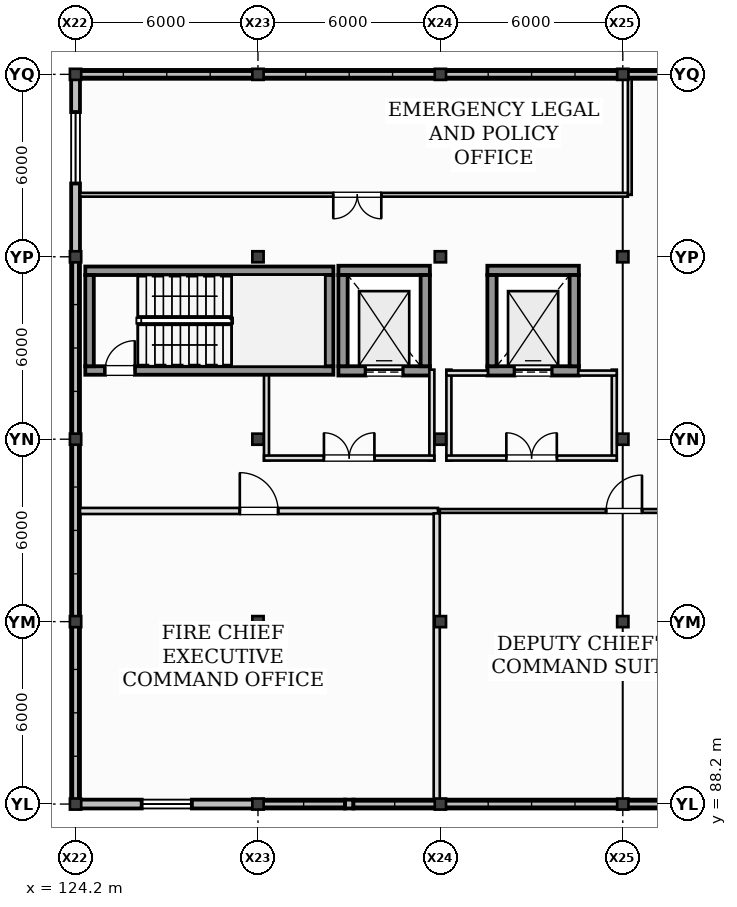
"""IFC4 building model, lengths in metres.
Left out: names, types, materials, properties, quantities, classifications, styles, units other than length and angle.
Written with IfcOpenShell. Run it as: python <this file> out.ifc"""

import sys

from ifc_helpers import new_model, si_unit, direction, frame, frame_2d, origin, origin_2d, place, context, subcontext, project, spatial, rectangle, i_section, extrude, element, fill, save


model = new_model("IFC4")
c1 = context("Model", 3, precision=1e-05, world=origin(), true_north=direction((0.0, 1.0)))
c2 = subcontext(c1, "Body", "Model", "MODEL_VIEW")
j1 = project(units=[si_unit("LENGTHUNIT", "METRE"), si_unit("PLANEANGLEUNIT", "RADIAN")], contexts=[c1])
p1 = place(None, origin())
s1 = spatial("IfcSite", under=j1, at=p1, CompositionType="ELEMENT")
p2 = place(p1, origin())
s2 = spatial("IfcBuilding", under=s1, at=p2, CompositionType="ELEMENT")
p3 = place(p2, frame((0.0, 0.0, 10.0)))
s3 = spatial("IfcBuildingStorey", under=s2, at=p3, CompositionType="ELEMENT", Elevation=10.0)
for number, where, z_axis, x_axis in (
    (1, (124.2, 88.2, 0.0), (0.0, 0.0, 1.0), (1.0, 0.0, 0.0)),
    (2, (124.2, 94.2, 0.0), (0.0, 0.0, 1.0), (1.0, 0.0, 0.0)),
    (3, (124.2, 100.2, 0.0), (0.0, 0.0, 1.0), (1.0, 0.0, 0.0)),
    (4, (124.2, 106.2, 0.0), (0.0, 0.0, 1.0), (1.0, 0.0, 0.0)),
    (5, (124.2, 112.2, 0.0), (0.0, 0.0, 1.0), (1.0, 0.0, 0.0)),
    (6, (130.2, 88.2, 0.0), (0.0, 0.0, 1.0), (1.0, 0.0, 0.0)),
    (7, (130.2, 94.2, 0.0), (0.0, 0.0, 1.0), (1.0, 0.0, 0.0)),
    (8, (130.2, 100.2, 0.0), (0.0, 0.0, 1.0), (1.0, 0.0, 0.0)),
    (9, (130.2, 106.2, 0.0), (0.0, 0.0, 1.0), (1.0, 0.0, 0.0)),
    (10, (130.2, 112.2, 0.0), (0.0, 0.0, 1.0), (1.0, 0.0, 0.0)),
    (11, (136.2, 88.2, 0.0), (0.0, 0.0, 1.0), (1.0, 0.0, 0.0)),
    (12, (136.2, 94.2, 0.0), (0.0, 0.0, 1.0), (1.0, 0.0, 0.0)),
    (13, (136.2, 100.2, 0.0), (0.0, 0.0, 1.0), (1.0, 0.0, 0.0)),
    (14, (136.2, 106.2, 0.0), (0.0, 0.0, 1.0), (1.0, 0.0, 0.0)),
    (15, (136.2, 112.2, 0.0), (0.0, 0.0, 1.0), (1.0, 0.0, 0.0)),
    (16, (142.2, 88.2, 0.0), (0.0, 0.0, 1.0), (1.0, 0.0, 0.0)),
    (17, (142.2, 94.2, 0.0), (0.0, 0.0, 1.0), (1.0, 0.0, 0.0)),
    (18, (142.2, 100.2, 0.0), (0.0, 0.0, 1.0), (1.0, 0.0, 0.0)),
    (19, (142.2, 106.2, 0.0), (0.0, 0.0, 1.0), (1.0, 0.0, 0.0)),
    (20, (142.2, 112.2, 0.0), (0.0, 0.0, 1.0), (1.0, 0.0, 0.0)),
):
    element("IfcColumn", number, at=place(p3, frame(where, z_axis=z_axis, x_axis=x_axis)), inside=s3, PredefinedType="COLUMN", context=c2, shape_type="SweptSolid", body=[
        extrude(i_section(OverallWidth=0.371, OverallDepth=0.364, WebThickness=0.013, FlangeThickness=0.022, at=origin_2d()), origin(), (0.0, 0.0, 1.0), 4.0),
    ])
p4 = place(p3, frame((124.345, 88.2, 0.0), z_axis=(0.0, 0.0, 1.0), x_axis=(1.0, 0.0, 0.0)))
e21 = element("IfcWall", 21, at=p4, inside=s3, PredefinedType="STANDARD", context=c2, shape_type="SweptSolid", body=[
    extrude(rectangle(XDim=5.71, YDim=0.29, at=frame_2d((2.855, 0.0))), origin(), (0.0, 0.0, 1.0), 3.249),
])
p5 = place(p4, frame((2.03, 0.0, 1.0)))
e22 = element("IfcOpeningElement", 22, at=p5, cuts=e21, PredefinedType="OPENING", context=c2, shape_type="SweptSolid", body=[
    extrude(rectangle(XDim=1.65, YDim=1.55, at=frame_2d((0.825, 0.775))), frame((0.0, 0.155, 0.0), z_axis=(0.0, -1.0, 0.0), x_axis=(1.0, 0.0, 0.0)), (0.0, 0.0, 1.0), 0.31),
])
p6 = place(p3, frame((133.06, 88.2, 0.0), z_axis=(0.0, 0.0, 1.0), x_axis=(1.0, 0.0, 0.0)))
e23 = element("IfcWall", 23, at=p6, inside=s3, PredefinedType="STANDARD", context=c2, shape_type="SweptSolid", body=[
    extrude(rectangle(XDim=0.28, YDim=0.29, at=frame_2d((0.14, 0.0))), origin(), (0.0, 0.0, 1.0), 3.249),
])
p7 = place(p3, frame((130.345, 88.2, 0.0), z_axis=(0.0, 0.0, 1.0), x_axis=(1.0, 0.0, 0.0)))
e24 = element("IfcWall", 24, at=p7, inside=s3, PredefinedType="STANDARD", context=c2, shape_type="SweptSolid", body=[
    extrude(rectangle(XDim=2.715, YDim=0.29, at=frame_2d((1.357, 0.0))), origin(), (0.0, 0.0, 1.0), 0.32),
])
p8 = place(p3, frame((133.34, 88.2, 0.0), z_axis=(0.0, 0.0, 1.0), x_axis=(1.0, 0.0, 0.0)))
e25 = element("IfcWall", 25, at=p8, inside=s3, PredefinedType="STANDARD", context=c2, shape_type="SweptSolid", body=[
    extrude(rectangle(XDim=2.715, YDim=0.29, at=frame_2d((1.357, 0.0))), origin(), (0.0, 0.0, 1.0), 0.44),
])
p9 = place(p3, frame((136.345, 88.2, 0.0), z_axis=(0.0, 0.0, 1.0), x_axis=(1.0, 0.0, 0.0)))
e26 = element("IfcWall", 26, at=p9, inside=s3, PredefinedType="STANDARD", context=c2, shape_type="SweptSolid", body=[
    extrude(rectangle(XDim=5.71, YDim=0.29, at=frame_2d((2.855, 0.0))), origin(), (0.0, 0.0, 1.0), 0.56),
])
p10 = place(p3, frame((142.345, 88.2, 0.0), z_axis=(0.0, 0.0, 1.0), x_axis=(1.0, 0.0, 0.0)))
e27 = element("IfcWall", 27, at=p10, inside=s3, PredefinedType="STANDARD", context=c2, shape_type="SweptSolid", body=[
    extrude(rectangle(XDim=2.715, YDim=0.29, at=frame_2d((1.357, 0.0))), origin(), (0.0, 0.0, 1.0), 0.68),
])
p11 = place(p3, frame((130.055, 112.2, 0.0), z_axis=(0.0, 0.0, 1.0), x_axis=(-1.0, 0.0, 0.0)))
e28 = element("IfcWall", 28, at=p11, inside=s3, PredefinedType="STANDARD", context=c2, shape_type="SweptSolid", body=[
    extrude(rectangle(XDim=5.71, YDim=0.29, at=frame_2d((2.855, 0.0))), origin(), (0.0, 0.0, 1.0), 0.32),
])
p12 = place(p3, frame((136.055, 112.2, 0.0), z_axis=(0.0, 0.0, 1.0), x_axis=(-1.0, 0.0, 0.0)))
e29 = element("IfcWall", 29, at=p12, inside=s3, PredefinedType="STANDARD", context=c2, shape_type="SweptSolid", body=[
    extrude(rectangle(XDim=5.71, YDim=0.29, at=frame_2d((2.855, 0.0))), origin(), (0.0, 0.0, 1.0), 0.44),
])
p13 = place(p3, frame((142.055, 112.2, 0.0), z_axis=(0.0, 0.0, 1.0), x_axis=(-1.0, 0.0, 0.0)))
e30 = element("IfcWall", 30, at=p13, inside=s3, PredefinedType="STANDARD", context=c2, shape_type="SweptSolid", body=[
    extrude(rectangle(XDim=5.71, YDim=0.29, at=frame_2d((2.855, 0.0))), origin(), (0.0, 0.0, 1.0), 0.56),
])
p14 = place(p3, frame((148.055, 112.2, 0.0), z_axis=(0.0, 0.0, 1.0), x_axis=(-1.0, 0.0, 0.0)))
e31 = element("IfcWall", 31, at=p14, inside=s3, PredefinedType="STANDARD", context=c2, shape_type="SweptSolid", body=[
    extrude(rectangle(XDim=5.71, YDim=0.29, at=frame_2d((2.855, 0.0))), origin(), (0.0, 0.0, 1.0), 0.68),
])
p15 = place(p3, frame((124.2, 94.055, 0.0), z_axis=(0.0, 0.0, 1.0), x_axis=(0.0, -1.0, 0.0)))
e32 = element("IfcWall", 32, at=p15, inside=s3, PredefinedType="STANDARD", context=c2, shape_type="SweptSolid", body=[
    extrude(rectangle(XDim=5.71, YDim=0.29, at=frame_2d((2.855, 0.0))), origin(), (0.0, 0.0, 1.0), 0.92),
])
p16 = place(p3, frame((124.2, 100.055, 0.0), z_axis=(0.0, 0.0, 1.0), x_axis=(0.0, -1.0, 0.0)))
e33 = element("IfcWall", 33, at=p16, inside=s3, PredefinedType="STANDARD", context=c2, shape_type="SweptSolid", body=[
    extrude(rectangle(XDim=5.71, YDim=0.29, at=frame_2d((2.855, 0.0))), origin(), (0.0, 0.0, 1.0), 0.32),
])
p17 = place(p3, frame((124.2, 106.055, 0.0), z_axis=(0.0, 0.0, 1.0), x_axis=(0.0, -1.0, 0.0)))
e34 = element("IfcWall", 34, at=p17, inside=s3, PredefinedType="STANDARD", context=c2, shape_type="SweptSolid", body=[
    extrude(rectangle(XDim=5.71, YDim=0.29, at=frame_2d((2.855, 0.0))), origin(), (0.0, 0.0, 1.0), 0.44),
])
p18 = place(p3, frame((124.2, 112.055, 0.0), z_axis=(0.0, 0.0, 1.0), x_axis=(0.0, -1.0, 0.0)))
e35 = element("IfcWall", 35, at=p18, inside=s3, PredefinedType="STANDARD", context=c2, shape_type="SweptSolid", body=[
    extrude(rectangle(XDim=5.71, YDim=0.29, at=frame_2d((2.855, 0.0))), origin(), (0.0, 0.0, 1.0), 3.253),
])
p19 = place(p18, frame((1.095, 0.0, 1.0)))
e36 = element("IfcOpeningElement", 36, at=p19, cuts=e35, PredefinedType="OPENING", context=c2, shape_type="SweptSolid", body=[
    extrude(rectangle(XDim=2.35, YDim=1.55, at=frame_2d((1.175, 0.775))), frame((0.0, 0.155, 0.0), z_axis=(0.0, -1.0, 0.0), x_axis=(1.0, 0.0, 0.0)), (0.0, 0.0, 1.0), 0.31),
])
p20 = place(p3, frame((124.52, 102.46, 0.0), z_axis=(0.0, 0.0, 1.0), x_axis=(1.0, 0.0, 0.0)))
e37 = element("IfcWall", 37, at=p20, inside=s3, PredefinedType="SHEAR", context=c2, shape_type="SweptSolid", body=[
    extrude(rectangle(XDim=8.16, YDim=0.28, at=frame_2d((4.08, 0.0))), origin(), (0.0, 0.0, 1.0), 4.0),
])
p21 = place(p20, frame((0.65, 0.0, 0.0)))
e38 = element("IfcOpeningElement", 38, at=p21, cuts=e37, PredefinedType="OPENING", context=c2, shape_type="SweptSolid", body=[
    extrude(rectangle(XDim=0.98, YDim=2.15, at=frame_2d((0.49, 1.075))), frame((0.0, 0.15, 0.0), z_axis=(0.0, -1.0, 0.0), x_axis=(1.0, 0.0, 0.0)), (0.0, 0.0, 1.0), 0.3),
])
p22 = place(p3, frame((132.68, 105.74, 0.0), z_axis=(0.0, 0.0, 1.0), x_axis=(-1.0, 0.0, 0.0)))
e39 = element("IfcWall", 39, at=p22, inside=s3, PredefinedType="SHEAR", context=c2, shape_type="SweptSolid", body=[
    extrude(rectangle(XDim=8.16, YDim=0.28, at=frame_2d((4.08, 0.0))), origin(), (0.0, 0.0, 1.0), 4.0),
])
for number, where, z_axis, x_axis in (
    (40, (124.66, 105.6, 0.0), (0.0, 0.0, 1.0), (0.0, -1.0, 0.0)),
    (41, (132.54, 102.6, 0.0), (0.0, 0.0, 1.0), (0.0, 1.0, 0.0)),
):
    element("IfcWall", number, at=place(p3, frame(where, z_axis=z_axis, x_axis=x_axis)), inside=s3, PredefinedType="SHEAR", context=c2, shape_type="SweptSolid", body=[
        extrude(rectangle(XDim=3.0, YDim=0.28, at=frame_2d((1.5, 0.0))), origin(), (0.0, 0.0, 1.0), 4.0),
    ])
p23 = place(p3, frame((132.845, 102.448, 0.0), z_axis=(0.0, 0.0, 1.0), x_axis=(1.0, 0.0, 0.0)))
e42 = element("IfcWall", 42, at=p23, inside=s3, PredefinedType="SHEAR", context=c2, shape_type="SweptSolid", body=[
    extrude(rectangle(XDim=3.01, YDim=0.305, at=frame_2d((1.505, 0.0))), origin(), (0.0, 0.0, 1.0), 4.0),
])
p24 = place(p23, frame((0.895, 0.0, 0.0)))
e43 = element("IfcOpeningElement", 43, at=p24, cuts=e42, PredefinedType="OPENING", context=c2, shape_type="SweptSolid", body=[
    extrude(rectangle(XDim=1.22, YDim=2.22, at=frame_2d((0.61, 1.11))), frame((0.0, 0.162, 0.0), z_axis=(0.0, -1.0, 0.0), x_axis=(1.0, 0.0, 0.0)), (0.0, 0.0, 1.0), 0.325),
])
p25 = place(p3, frame((135.855, 105.752, 0.0), z_axis=(0.0, 0.0, 1.0), x_axis=(-1.0, 0.0, 0.0)))
e44 = element("IfcWall", 44, at=p25, inside=s3, PredefinedType="SHEAR", context=c2, shape_type="SweptSolid", body=[
    extrude(rectangle(XDim=3.01, YDim=0.305, at=frame_2d((1.505, 0.0))), origin(), (0.0, 0.0, 1.0), 4.0),
])
for number, where, z_axis, x_axis in (
    (45, (132.998, 105.6, 0.0), (0.0, 0.0, 1.0), (0.0, -1.0, 0.0)),
    (46, (135.702, 102.6, 0.0), (0.0, 0.0, 1.0), (0.0, 1.0, 0.0)),
):
    element("IfcWall", number, at=place(p3, frame(where, z_axis=z_axis, x_axis=x_axis)), inside=s3, PredefinedType="SHEAR", context=c2, shape_type="SweptSolid", body=[
        extrude(rectangle(XDim=3.0, YDim=0.305, at=frame_2d((1.5, 0.0))), origin(), (0.0, 0.0, 1.0), 4.0),
    ])
for number, where, z_axis, x_axis in (
    (47, (130.48, 99.5, 0.0), (0.0, 0.0, 1.0), (0.0, 1.0, 0.0)),
    (48, (135.92, 102.488, 0.0), (0.0, 0.0, 1.0), (0.0, -1.0, 0.0)),
):
    element("IfcWall", number, at=place(p3, frame(where, z_axis=z_axis, x_axis=x_axis)), inside=s3, PredefinedType="PARTITIONING", context=c2, shape_type="SweptSolid", body=[
        extrude(rectangle(XDim=2.988, YDim=0.165, at=frame_2d((1.494, 0.0))), origin(), (0.0, 0.0, 1.0), 3.253),
    ])
p26 = place(p3, frame((130.4, 99.58, 0.0), z_axis=(0.0, 0.0, 1.0), x_axis=(1.0, 0.0, 0.0)))
e49 = element("IfcWall", 49, at=p26, inside=s3, PredefinedType="PARTITIONING", context=c2, shape_type="SweptSolid", body=[
    extrude(rectangle(XDim=5.6, YDim=0.165, at=frame_2d((2.8, 0.0))), origin(), (0.0, 0.0, 1.0), 3.74),
])
p27 = place(p26, frame((1.97, 0.0, 0.0)))
e50 = element("IfcOpeningElement", 50, at=p27, cuts=e49, PredefinedType="OPENING", context=c2, shape_type="SweptSolid", body=[
    extrude(rectangle(XDim=1.66, YDim=2.2, at=frame_2d((0.83, 1.1))), frame((0.0, 0.093, 0.0), z_axis=(0.0, -1.0, 0.0), x_axis=(1.0, 0.0, 0.0)), (0.0, 0.0, 1.0), 0.185),
])
p28 = place(p3, frame((137.745, 102.448, 0.0), z_axis=(0.0, 0.0, 1.0), x_axis=(1.0, 0.0, 0.0)))
e51 = element("IfcWall", 51, at=p28, inside=s3, PredefinedType="SHEAR", context=c2, shape_type="SweptSolid", body=[
    extrude(rectangle(XDim=3.01, YDim=0.305, at=frame_2d((1.505, 0.0))), origin(), (0.0, 0.0, 1.0), 4.0),
])
p29 = place(p28, frame((0.895, 0.0, 0.0)))
e52 = element("IfcOpeningElement", 52, at=p29, cuts=e51, PredefinedType="OPENING", context=c2, shape_type="SweptSolid", body=[
    extrude(rectangle(XDim=1.22, YDim=2.22, at=frame_2d((0.61, 1.11))), frame((0.0, 0.162, 0.0), z_axis=(0.0, -1.0, 0.0), x_axis=(1.0, 0.0, 0.0)), (0.0, 0.0, 1.0), 0.325),
])
p30 = place(p3, frame((140.755, 105.752, 0.0), z_axis=(0.0, 0.0, 1.0), x_axis=(-1.0, 0.0, 0.0)))
e53 = element("IfcWall", 53, at=p30, inside=s3, PredefinedType="SHEAR", context=c2, shape_type="SweptSolid", body=[
    extrude(rectangle(XDim=3.01, YDim=0.305, at=frame_2d((1.505, 0.0))), origin(), (0.0, 0.0, 1.0), 4.0),
])
for number, where, z_axis, x_axis in (
    (54, (137.897, 105.6, 0.0), (0.0, 0.0, 1.0), (0.0, -1.0, 0.0)),
    (55, (140.603, 102.6, 0.0), (0.0, 0.0, 1.0), (0.0, 1.0, 0.0)),
):
    element("IfcWall", number, at=place(p3, frame(where, z_axis=z_axis, x_axis=x_axis)), inside=s3, PredefinedType="SHEAR", context=c2, shape_type="SweptSolid", body=[
        extrude(rectangle(XDim=3.0, YDim=0.305, at=frame_2d((1.5, 0.0))), origin(), (0.0, 0.0, 1.0), 4.0),
    ])
for number, where, z_axis, x_axis in (
    (56, (136.48, 99.5, 0.0), (0.0, 0.0, 1.0), (0.0, 1.0, 0.0)),
    (57, (141.92, 102.488, 0.0), (0.0, 0.0, 1.0), (0.0, -1.0, 0.0)),
):
    element("IfcWall", number, at=place(p3, frame(where, z_axis=z_axis, x_axis=x_axis)), inside=s3, PredefinedType="PARTITIONING", context=c2, shape_type="SweptSolid", body=[
        extrude(rectangle(XDim=2.988, YDim=0.165, at=frame_2d((1.494, 0.0))), origin(), (0.0, 0.0, 1.0), 3.253),
    ])
p31 = place(p3, frame((136.4, 102.375, 0.0), z_axis=(0.0, 0.0, 1.0), x_axis=(1.0, 0.0, 0.0)))
e58 = element("IfcWall", 58, at=p31, inside=s3, PredefinedType="PARTITIONING", context=c2, shape_type="SweptSolid", body=[
    extrude(rectangle(XDim=1.365, YDim=0.165, at=frame_2d((0.683, 0.0))), origin(), (0.0, 0.0, 1.0), 3.74),
])
p32 = place(p3, frame((140.735, 102.375, 0.0), z_axis=(0.0, 0.0, 1.0), x_axis=(1.0, 0.0, 0.0)))
e59 = element("IfcWall", 59, at=p32, inside=s3, PredefinedType="PARTITIONING", context=c2, shape_type="SweptSolid", body=[
    extrude(rectangle(XDim=1.265, YDim=0.165, at=frame_2d((0.632, 0.0))), origin(), (0.0, 0.0, 1.0), 3.74),
])
p33 = place(p3, frame((136.4, 99.58, 0.0), z_axis=(0.0, 0.0, 1.0), x_axis=(1.0, 0.0, 0.0)))
e60 = element("IfcWall", 60, at=p33, inside=s3, PredefinedType="PARTITIONING", context=c2, shape_type="SweptSolid", body=[
    extrude(rectangle(XDim=5.6, YDim=0.165, at=frame_2d((2.8, 0.0))), origin(), (0.0, 0.0, 1.0), 3.74),
])
p34 = place(p33, frame((1.97, 0.0, 0.0)))
e61 = element("IfcOpeningElement", 61, at=p34, cuts=e60, PredefinedType="OPENING", context=c2, shape_type="SweptSolid", body=[
    extrude(rectangle(XDim=1.66, YDim=2.2, at=frame_2d((0.83, 1.1))), frame((0.0, 0.093, 0.0), z_axis=(0.0, -1.0, 0.0), x_axis=(1.0, 0.0, 0.0)), (0.0, 0.0, 1.0), 0.185),
])
p35 = place(p3, frame((124.345, 97.84, 0.0), z_axis=(0.0, 0.0, 1.0), x_axis=(1.0, 0.0, 0.0)))
e62 = element("IfcWall", 62, at=p35, inside=s3, PredefinedType="PARTITIONING", context=c2, shape_type="SweptSolid", body=[
    extrude(rectangle(XDim=11.775, YDim=0.2, at=frame_2d((5.888, 0.0))), origin(), (0.0, 0.0, 1.0), 3.74),
])
p36 = place(p35, frame((5.258, 0.0, 0.0)))
e63 = element("IfcOpeningElement", 63, at=p36, cuts=e62, PredefinedType="OPENING", context=c2, shape_type="SweptSolid", body=[
    extrude(rectangle(XDim=1.26, YDim=2.2, at=frame_2d((0.63, 1.1))), frame((0.0, 0.11, 0.0), z_axis=(0.0, -1.0, 0.0), x_axis=(1.0, 0.0, 0.0)), (0.0, 0.0, 1.0), 0.22),
])
p37 = place(p3, frame((136.08, 97.76, 0.0), z_axis=(0.0, 0.0, 1.0), x_axis=(0.0, -1.0, 0.0)))
e64 = element("IfcWall", 64, at=p37, inside=s3, PredefinedType="PARTITIONING", context=c2, shape_type="SweptSolid", body=[
    extrude(rectangle(XDim=9.415, YDim=0.2, at=frame_2d((4.708, 0.0))), origin(), (0.0, 0.0, 1.0), 3.253),
])
p38 = place(p3, frame((136.18, 97.84, 0.0), z_axis=(0.0, 0.0, 1.0), x_axis=(1.0, 0.0, 0.0)))
e65 = element("IfcWall", 65, at=p38, inside=s3, PredefinedType="PARTITIONING", context=c2, shape_type="SweptSolid", body=[
    extrude(rectangle(XDim=11.903, YDim=0.125, at=frame_2d((5.951, 0.0))), origin(), (0.0, 0.0, 1.0), 3.74),
])
p39 = place(p38, frame((5.472, 0.0, 0.0)))
e66 = element("IfcOpeningElement", 66, at=p39, cuts=e65, PredefinedType="OPENING", context=c2, shape_type="SweptSolid", body=[
    extrude(rectangle(XDim=1.18, YDim=2.16, at=frame_2d((0.59, 1.08))), frame((0.0, 0.073, 0.0), z_axis=(0.0, -1.0, 0.0), x_axis=(1.0, 0.0, 0.0)), (0.0, 0.0, 1.0), 0.145),
])
p40 = place(p3, frame((142.43, 112.055, 0.0), z_axis=(0.0, 0.0, 1.0), x_axis=(0.0, -1.0, 0.0)))
e67 = element("IfcWall", 67, at=p40, inside=s3, PredefinedType="PARTITIONING", context=c2, shape_type="SweptSolid", body=[
    extrude(rectangle(XDim=3.817, YDim=0.125, at=frame_2d((1.909, 0.0))), origin(), (0.0, 0.0, 1.0), 3.253),
])
p41 = place(p3, frame((142.367, 108.24, 0.0), z_axis=(0.0, 0.0, 1.0), x_axis=(-1.0, 0.0, 0.0)))
e68 = element("IfcWall", 68, at=p41, inside=s3, PredefinedType="PARTITIONING", context=c2, shape_type="SweptSolid", body=[
    extrude(rectangle(XDim=18.022, YDim=0.125, at=frame_2d((9.011, 0.0))), origin(), (0.0, 0.0, 1.0), 3.74),
])
p42 = place(p41, frame((8.111, 0.0, 0.0)))
e69 = element("IfcOpeningElement", 69, at=p42, cuts=e68, PredefinedType="OPENING", context=c2, shape_type="SweptSolid", body=[
    extrude(rectangle(XDim=1.58, YDim=2.2, at=frame_2d((0.79, 1.1))), frame((0.0, 0.073, 0.0), z_axis=(0.0, -1.0, 0.0), x_axis=(1.0, 0.0, 0.0)), (0.0, 0.0, 1.0), 0.145),
])
p43 = place(p5, origin())
e70 = element("IfcWindow", 70, at=p43, inside=s3, PartitioningType="SINGLE_PANEL", PredefinedType="WINDOW", context=c2, shape_type="SweptSolid", body=[
    extrude(rectangle(XDim=1.65, YDim=1.55, at=frame_2d((0.825, 0.775))), frame((0.0, 0.03, 0.0), z_axis=(0.0, -1.0, 0.0), x_axis=(1.0, 0.0, 0.0)), (0.0, 0.0, 1.0), 0.06),
])
fill(e22, e70)
p44 = place(p19, origin())
e71 = element("IfcWindow", 71, at=p44, inside=s3, PartitioningType="SINGLE_PANEL", PredefinedType="WINDOW", context=c2, shape_type="SweptSolid", body=[
    extrude(rectangle(XDim=2.35, YDim=1.55, at=frame_2d((1.175, 0.775))), frame((0.0, 0.03, 0.0), z_axis=(0.0, -1.0, 0.0), x_axis=(1.0, 0.0, 0.0)), (0.0, 0.0, 1.0), 0.06),
])
fill(e36, e71)
p45 = place(p21, origin())
e72 = element("IfcDoor", 72, at=p45, inside=s3, OperationType="SINGLE_SWING_RIGHT", PredefinedType="DOOR", context=c2, shape_type="SweptSolid", body=[
    extrude(rectangle(XDim=0.98, YDim=2.15, at=frame_2d((0.49, 1.075))), frame((0.0, 0.025, 0.0), z_axis=(0.0, -1.0, 0.0), x_axis=(1.0, 0.0, 0.0)), (0.0, 0.0, 1.0), 0.05),
])
fill(e38, e72)
p46 = place(p24, origin())
e73 = element("IfcDoor", 73, at=p46, inside=s3, OperationType="SLIDING_TO_LEFT", PredefinedType="DOOR", context=c2, shape_type="SweptSolid", body=[
    extrude(rectangle(XDim=1.22, YDim=2.22, at=frame_2d((0.61, 1.11))), frame((0.0, 0.025, 0.0), z_axis=(0.0, -1.0, 0.0), x_axis=(1.0, 0.0, 0.0)), (0.0, 0.0, 1.0), 0.05),
])
fill(e43, e73)
p47 = place(p27, frame((1.66, 0.0, 0.0), z_axis=(0.0, 0.0, 1.0), x_axis=(-1.0, 0.0, 0.0)))
e74 = element("IfcDoor", 74, at=p47, inside=s3, OperationType="DOUBLE_DOOR_SINGLE_SWING", PredefinedType="DOOR", context=c2, shape_type="SweptSolid", body=[
    extrude(rectangle(XDim=1.66, YDim=2.2, at=frame_2d((0.83, 1.1))), frame((0.0, 0.025, 0.0), z_axis=(0.0, -1.0, 0.0), x_axis=(1.0, 0.0, 0.0)), (0.0, 0.0, 1.0), 0.05),
])
fill(e50, e74)
p48 = place(p29, origin())
e75 = element("IfcDoor", 75, at=p48, inside=s3, OperationType="SLIDING_TO_LEFT", PredefinedType="DOOR", context=c2, shape_type="SweptSolid", body=[
    extrude(rectangle(XDim=1.22, YDim=2.22, at=frame_2d((0.61, 1.11))), frame((0.0, 0.025, 0.0), z_axis=(0.0, -1.0, 0.0), x_axis=(1.0, 0.0, 0.0)), (0.0, 0.0, 1.0), 0.05),
])
fill(e52, e75)
p49 = place(p34, frame((1.66, 0.0, 0.0), z_axis=(0.0, 0.0, 1.0), x_axis=(-1.0, 0.0, 0.0)))
e76 = element("IfcDoor", 76, at=p49, inside=s3, OperationType="DOUBLE_DOOR_SINGLE_SWING", PredefinedType="DOOR", context=c2, shape_type="SweptSolid", body=[
    extrude(rectangle(XDim=1.66, YDim=2.2, at=frame_2d((0.83, 1.1))), frame((0.0, 0.025, 0.0), z_axis=(0.0, -1.0, 0.0), x_axis=(1.0, 0.0, 0.0)), (0.0, 0.0, 1.0), 0.05),
])
fill(e61, e76)
p50 = place(p36, frame((1.26, 0.0, 0.0), z_axis=(0.0, 0.0, 1.0), x_axis=(-1.0, 0.0, 0.0)))
e77 = element("IfcDoor", 77, at=p50, inside=s3, OperationType="SINGLE_SWING_LEFT", PredefinedType="DOOR", context=c2, shape_type="SweptSolid", body=[
    extrude(rectangle(XDim=1.26, YDim=2.2, at=frame_2d((0.63, 1.1))), frame((0.0, 0.025, 0.0), z_axis=(0.0, -1.0, 0.0), x_axis=(1.0, 0.0, 0.0)), (0.0, 0.0, 1.0), 0.05),
])
fill(e63, e77)
p51 = place(p39, frame((1.18, 0.0, 0.0), z_axis=(0.0, 0.0, 1.0), x_axis=(-1.0, 0.0, 0.0)))
e78 = element("IfcDoor", 78, at=p51, inside=s3, OperationType="SINGLE_SWING_RIGHT", PredefinedType="DOOR", context=c2, shape_type="SweptSolid", body=[
    extrude(rectangle(XDim=1.18, YDim=2.16, at=frame_2d((0.59, 1.08))), frame((0.0, 0.025, 0.0), z_axis=(0.0, -1.0, 0.0), x_axis=(1.0, 0.0, 0.0)), (0.0, 0.0, 1.0), 0.05),
])
fill(e66, e78)
p52 = place(p42, frame((1.58, 0.0, 0.0), z_axis=(0.0, 0.0, 1.0), x_axis=(-1.0, 0.0, 0.0)))
e79 = element("IfcDoor", 79, at=p52, inside=s3, OperationType="DOUBLE_DOOR_SINGLE_SWING", PredefinedType="DOOR", context=c2, shape_type="SweptSolid", body=[
    extrude(rectangle(XDim=1.58, YDim=2.2, at=frame_2d((0.79, 1.1))), frame((0.0, 0.025, 0.0), z_axis=(0.0, -1.0, 0.0), x_axis=(1.0, 0.0, 0.0)), (0.0, 0.0, 1.0), 0.05),
])
fill(e69, e79)
save(model, sys.argv[1])
